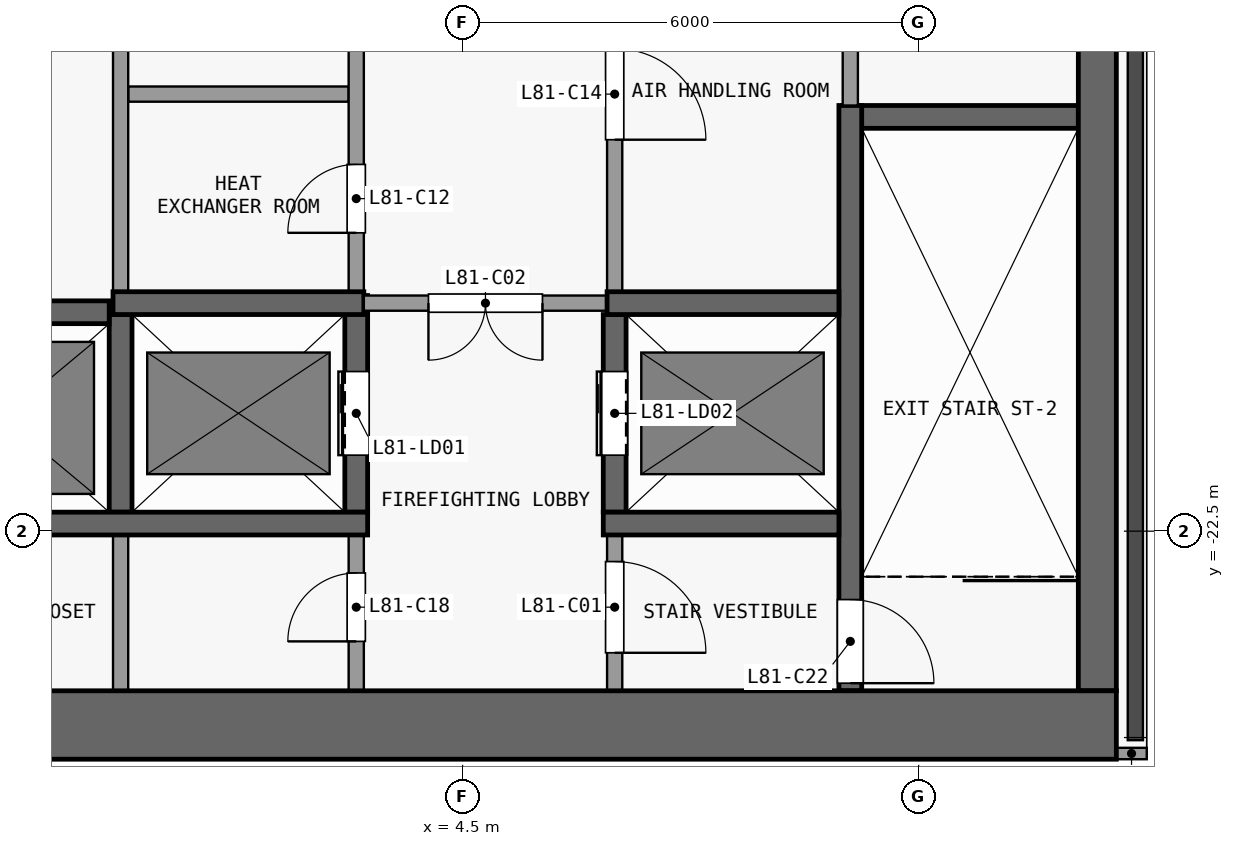
"""IFC4 building model, lengths in metres.
Left out: names, types, materials, properties, quantities, classifications, styles, units other than length and angle.
Written with IfcOpenShell. Run it as: python <this file> out.ifc"""

import sys

from ifc_helpers import new_model, si_unit, direction, frame, frame_2d, origin, place, context, subcontext, project, spatial, rectangle, extrude, element, fill, save


model = new_model("IFC4")
c1 = context("Model", 3, precision=1e-05, world=origin(), true_north=direction((0.0, 1.0)))
c2 = subcontext(c1, "Body", "Model", "MODEL_VIEW")
j1 = project(units=[si_unit("LENGTHUNIT", "METRE"), si_unit("PLANEANGLEUNIT", "RADIAN")], contexts=[c1])
p1 = place(None, origin())
s1 = spatial("IfcSite", under=j1, at=p1, CompositionType="ELEMENT")
p2 = place(p1, origin())
s2 = spatial("IfcBuilding", under=s1, at=p2, CompositionType="ELEMENT")
p3 = place(p2, frame((0.0, 0.0, 321.2)))
s3 = spatial("IfcBuildingStorey", under=s2, at=p3, CompositionType="ELEMENT", Elevation=321.2)
p4 = place(p3, frame((-13.1, -25.05, 0.0), z_axis=(0.0, 0.0, 1.0), x_axis=(1.0, 0.0, 0.0)))
e1 = element("IfcWall", 1, at=p4, inside=s3, PredefinedType="SHEAR", context=c2, shape_type="SweptSolid", body=[
    extrude(rectangle(XDim=26.2, YDim=0.9, at=frame_2d((13.1, 0.0))), origin(), (0.0, 0.0, 1.0), 4.05),
])
p5 = place(p3, frame((12.85, -24.6, 0.0), z_axis=(0.0, 0.0, 1.0), x_axis=(0.0, 1.0, 0.0)))
e2 = element("IfcWall", 2, at=p5, inside=s3, PredefinedType="SHEAR", context=c2, shape_type="SweptSolid", body=[
    extrude(rectangle(XDim=16.1, YDim=0.5, at=frame_2d((8.05, 0.0))), origin(), (0.0, 0.0, 1.0), 4.05),
])
p6 = place(p3, frame((-3.25, -22.4, 0.0), z_axis=(0.0, 0.0, 1.0), x_axis=(1.0, 0.0, 0.0)))
e3 = element("IfcWall", 3, at=p6, inside=s3, PredefinedType="SHEAR", context=c2, shape_type="SweptSolid", body=[
    extrude(rectangle(XDim=6.5, YDim=0.3, at=frame_2d((3.25, 0.0))), origin(), (0.0, 0.0, 1.0), 4.05),
])
p7 = place(p3, frame((6.35, -22.4, 0.0), z_axis=(0.0, 0.0, 1.0), x_axis=(1.0, 0.0, 0.0)))
e4 = element("IfcWall", 4, at=p7, inside=s3, PredefinedType="SHEAR", context=c2, shape_type="SweptSolid", body=[
    extrude(rectangle(XDim=3.1, YDim=0.3, at=frame_2d((1.55, 0.0))), origin(), (0.0, 0.0, 1.0), 4.05),
])
p8 = place(p3, frame((-3.2, -19.62, 0.0), z_axis=(0.0, 0.0, 1.0), x_axis=(1.0, 0.0, 0.0)))
e5 = element("IfcWall", 5, at=p8, inside=s3, PredefinedType="SHEAR", context=c2, shape_type="SweptSolid", body=[
    extrude(rectangle(XDim=3.05, YDim=0.3, at=frame_2d((1.525, 0.0))), origin(), (0.0, 0.0, 1.0), 4.05),
])
p9 = place(p3, frame((-0.1, -19.5, 0.0), z_axis=(0.0, 0.0, 1.0), x_axis=(1.0, 0.0, 0.0)))
e6 = element("IfcWall", 6, at=p9, inside=s3, PredefinedType="SHEAR", context=c2, shape_type="SweptSolid", body=[
    extrude(rectangle(XDim=3.3, YDim=0.3, at=frame_2d((1.65, 0.0))), origin(), (0.0, 0.0, 1.0), 4.05),
])
p10 = place(p3, frame((6.4, -19.5, 0.0), z_axis=(0.0, 0.0, 1.0), x_axis=(-1.0, 0.0, 0.0)))
e7 = element("IfcWall", 7, at=p10, inside=s3, PredefinedType="PARTITIONING", context=c2, shape_type="SweptSolid", body=[
    extrude(rectangle(XDim=3.2, YDim=0.2, at=frame_2d((1.6, 0.0))), origin(), (0.0, 0.0, 1.0), 4.05),
])
p11 = place(p10, frame((0.85, 0.0, 0.0)))
e8 = element("IfcOpeningElement", 8, at=p11, cuts=e7, PredefinedType="OPENING", context=c2, shape_type="SweptSolid", body=[
    extrude(rectangle(XDim=1.5, YDim=2.1, at=frame_2d((0.75, 1.05))), frame((0.0, 0.11, 0.0), z_axis=(0.0, -1.0, 0.0), x_axis=(1.0, 0.0, 0.0)), (0.0, 0.0, 1.0), 0.22),
])
p12 = place(p3, frame((6.4, -19.5, 0.0), z_axis=(0.0, 0.0, 1.0), x_axis=(1.0, 0.0, 0.0)))
e9 = element("IfcWall", 9, at=p12, inside=s3, PredefinedType="SHEAR", context=c2, shape_type="SweptSolid", body=[
    extrude(rectangle(XDim=3.05, YDim=0.3, at=frame_2d((1.525, 0.0))), origin(), (0.0, 0.0, 1.0), 4.05),
])
p13 = place(p3, frame((9.5, -17.05, 0.0), z_axis=(0.0, 0.0, 1.0), x_axis=(1.0, 0.0, 0.0)))
e10 = element("IfcWall", 10, at=p13, inside=s3, PredefinedType="SHEAR", context=c2, shape_type="SweptSolid", body=[
    extrude(rectangle(XDim=3.1, YDim=0.3, at=frame_2d((1.55, 0.0))), origin(), (0.0, 0.0, 1.0), 4.05),
])
p14 = place(p3, frame((0.1, -16.75, 0.0), z_axis=(0.0, 0.0, 1.0), x_axis=(1.0, 0.0, 0.0)))
e11 = element("IfcWall", 11, at=p14, inside=s3, PredefinedType="PARTITIONING", context=c2, shape_type="SweptSolid", body=[
    extrude(rectangle(XDim=2.9, YDim=0.2, at=frame_2d((1.45, 0.0))), origin(), (0.0, 0.0, 1.0), 4.05),
])
p15 = place(p3, frame((0.0, -24.6, 0.0), z_axis=(0.0, 0.0, 1.0), x_axis=(0.0, 1.0, 0.0)))
e12 = element("IfcWall", 12, at=p15, inside=s3, PredefinedType="PARTITIONING", context=c2, shape_type="SweptSolid", body=[
    extrude(rectangle(XDim=2.05, YDim=0.2, at=frame_2d((1.025, 0.0))), origin(), (0.0, 0.0, 1.0), 4.05),
])
p16 = place(p3, frame((0.0, -22.25, 0.0), z_axis=(0.0, 0.0, 1.0), x_axis=(0.0, 1.0, 0.0)))
e13 = element("IfcWall", 13, at=p16, inside=s3, PredefinedType="SHEAR", context=c2, shape_type="SweptSolid", body=[
    extrude(rectangle(XDim=2.6, YDim=0.3, at=frame_2d((1.3, 0.0))), origin(), (0.0, 0.0, 1.0), 4.05),
])
p17 = place(p3, frame((0.0, -19.35, 0.0), z_axis=(0.0, 0.0, 1.0), x_axis=(0.0, 1.0, 0.0)))
e14 = element("IfcWall", 14, at=p17, inside=s3, PredefinedType="PARTITIONING", context=c2, shape_type="SweptSolid", body=[
    extrude(rectangle(XDim=10.85, YDim=0.2, at=frame_2d((5.425, 0.0))), origin(), (0.0, 0.0, 1.0), 4.05),
])
p18 = place(p3, frame((3.1, -24.6, 0.0), z_axis=(0.0, 0.0, 1.0), x_axis=(0.0, 1.0, 0.0)))
e15 = element("IfcWall", 15, at=p18, inside=s3, PredefinedType="PARTITIONING", context=c2, shape_type="SweptSolid", body=[
    extrude(rectangle(XDim=2.05, YDim=0.2, at=frame_2d((1.025, 0.0))), origin(), (0.0, 0.0, 1.0), 4.05),
])
p19 = place(p18, frame((0.65, 0.0, 0.0)))
e16 = element("IfcOpeningElement", 16, at=p19, cuts=e15, PredefinedType="OPENING", context=c2, shape_type="SweptSolid", body=[
    extrude(rectangle(XDim=0.9, YDim=2.1, at=frame_2d((0.45, 1.05))), frame((0.0, 0.11, 0.0), z_axis=(0.0, -1.0, 0.0), x_axis=(1.0, 0.0, 0.0)), (0.0, 0.0, 1.0), 0.22),
])
p20 = place(p3, frame((3.1, -22.25, 0.0), z_axis=(0.0, 0.0, 1.0), x_axis=(0.0, 1.0, 0.0)))
e17 = element("IfcWall", 17, at=p20, inside=s3, PredefinedType="SHEAR", context=c2, shape_type="SweptSolid", body=[
    extrude(rectangle(XDim=2.85, YDim=0.3, at=frame_2d((1.425, 0.0))), origin(), (0.0, 0.0, 1.0), 4.05),
])
p21 = place(p20, frame((0.75, 0.0, 0.0)))
e18 = element("IfcOpeningElement", 18, at=p21, cuts=e17, PredefinedType="OPENING", context=c2, shape_type="SweptSolid", body=[
    extrude(rectangle(XDim=1.1, YDim=2.1, at=frame_2d((0.55, 1.05))), frame((0.0, 0.16, 0.0), z_axis=(0.0, -1.0, 0.0), x_axis=(1.0, 0.0, 0.0)), (0.0, 0.0, 1.0), 0.32),
])
p22 = place(p3, frame((3.1, -19.6, 0.0), z_axis=(0.0, 0.0, 1.0), x_axis=(0.0, 1.0, 0.0)))
e19 = element("IfcWall", 19, at=p22, inside=s3, PredefinedType="PARTITIONING", context=c2, shape_type="SweptSolid", body=[
    extrude(rectangle(XDim=11.1, YDim=0.2, at=frame_2d((5.55, 0.0))), origin(), (0.0, 0.0, 1.0), 4.05),
])
p23 = place(p22, frame((1.025, 0.0, 0.0)))
e20 = element("IfcOpeningElement", 20, at=p23, cuts=e19, PredefinedType="OPENING", context=c2, shape_type="SweptSolid", body=[
    extrude(rectangle(XDim=0.9, YDim=2.1, at=frame_2d((0.45, 1.05))), frame((0.0, 0.11, 0.0), z_axis=(0.0, -1.0, 0.0), x_axis=(1.0, 0.0, 0.0)), (0.0, 0.0, 1.0), 0.22),
])
p24 = place(p22, frame((6.375, 0.0, 0.0)))
e21 = element("IfcOpeningElement", 21, at=p24, cuts=e19, PredefinedType="OPENING", context=c2, shape_type="SweptSolid", body=[
    extrude(rectangle(XDim=1.2, YDim=2.1, at=frame_2d((0.6, 1.05))), frame((0.0, 0.11, 0.0), z_axis=(0.0, -1.0, 0.0), x_axis=(1.0, 0.0, 0.0)), (0.0, 0.0, 1.0), 0.22),
])
p25 = place(p3, frame((6.5, -22.55, 0.0), z_axis=(0.0, 0.0, 1.0), x_axis=(0.0, -1.0, 0.0)))
e22 = element("IfcWall", 22, at=p25, inside=s3, PredefinedType="PARTITIONING", context=c2, shape_type="SweptSolid", body=[
    extrude(rectangle(XDim=2.05, YDim=0.2, at=frame_2d((1.025, 0.0))), origin(), (0.0, 0.0, 1.0), 4.05),
])
p26 = place(p25, frame((0.35, 0.0, 0.0)))
e23 = element("IfcOpeningElement", 23, at=p26, cuts=e22, PredefinedType="OPENING", context=c2, shape_type="SweptSolid", body=[
    extrude(rectangle(XDim=1.2, YDim=2.1, at=frame_2d((0.6, 1.05))), frame((0.0, 0.11, 0.0), z_axis=(0.0, -1.0, 0.0), x_axis=(1.0, 0.0, 0.0)), (0.0, 0.0, 1.0), 0.22),
])
p27 = place(p3, frame((6.5, -22.25, 0.0), z_axis=(0.0, 0.0, 1.0), x_axis=(0.0, 1.0, 0.0)))
e24 = element("IfcWall", 24, at=p27, inside=s3, PredefinedType="SHEAR", context=c2, shape_type="SweptSolid", body=[
    extrude(rectangle(XDim=2.6, YDim=0.3, at=frame_2d((1.3, 0.0))), origin(), (0.0, 0.0, 1.0), 4.05),
])
p28 = place(p27, frame((0.75, 0.0, 0.0)))
e25 = element("IfcOpeningElement", 25, at=p28, cuts=e24, PredefinedType="OPENING", context=c2, shape_type="SweptSolid", body=[
    extrude(rectangle(XDim=1.1, YDim=2.1, at=frame_2d((0.55, 1.05))), frame((0.0, 0.16, 0.0), z_axis=(0.0, -1.0, 0.0), x_axis=(1.0, 0.0, 0.0)), (0.0, 0.0, 1.0), 0.32),
])
p29 = place(p3, frame((6.5, -8.5, 0.0), z_axis=(0.0, 0.0, 1.0), x_axis=(0.0, -1.0, 0.0)))
e26 = element("IfcWall", 26, at=p29, inside=s3, PredefinedType="PARTITIONING", context=c2, shape_type="SweptSolid", body=[
    extrude(rectangle(XDim=10.85, YDim=0.2, at=frame_2d((5.425, 0.0))), origin(), (0.0, 0.0, 1.0), 4.05),
])
p30 = place(p29, frame((7.65, 0.0, 0.0)))
e27 = element("IfcOpeningElement", 27, at=p30, cuts=e26, PredefinedType="OPENING", context=c2, shape_type="SweptSolid", body=[
    extrude(rectangle(XDim=1.2, YDim=2.1, at=frame_2d((0.6, 1.05))), frame((0.0, 0.11, 0.0), z_axis=(0.0, -1.0, 0.0), x_axis=(1.0, 0.0, 0.0)), (0.0, 0.0, 1.0), 0.22),
])
p31 = place(p29, frame((2.15, 0.0, 0.0)))
e28 = element("IfcOpeningElement", 28, at=p31, cuts=e26, PredefinedType="OPENING", context=c2, shape_type="SweptSolid", body=[
    extrude(rectangle(XDim=1.2, YDim=2.1, at=frame_2d((0.6, 1.05))), frame((0.0, 0.11, 0.0), z_axis=(0.0, -1.0, 0.0), x_axis=(1.0, 0.0, 0.0)), (0.0, 0.0, 1.0), 0.22),
])
p32 = place(p3, frame((9.6, -16.9, 0.0), z_axis=(0.0, 0.0, 1.0), x_axis=(0.0, -1.0, 0.0)))
e29 = element("IfcWall", 29, at=p32, inside=s3, PredefinedType="SHEAR", context=c2, shape_type="SweptSolid", body=[
    extrude(rectangle(XDim=7.7, YDim=0.3, at=frame_2d((3.85, 0.0))), origin(), (0.0, 0.0, 1.0), 4.05),
])
p33 = place(p32, frame((6.5, 0.0, 0.0)))
e30 = element("IfcOpeningElement", 30, at=p33, cuts=e29, PredefinedType="OPENING", context=c2, shape_type="SweptSolid", body=[
    extrude(rectangle(XDim=1.1, YDim=2.1, at=frame_2d((0.55, 1.05))), frame((0.0, 0.16, 0.0), z_axis=(0.0, -1.0, 0.0), x_axis=(1.0, 0.0, 0.0)), (0.0, 0.0, 1.0), 0.32),
])
p34 = place(p3, frame((9.6, -16.9, 0.0), z_axis=(0.0, 0.0, 1.0), x_axis=(0.0, 1.0, 0.0)))
e31 = element("IfcWall", 31, at=p34, inside=s3, PredefinedType="PARTITIONING", context=c2, shape_type="SweptSolid", body=[
    extrude(rectangle(XDim=8.4, YDim=0.2, at=frame_2d((4.2, 0.0))), origin(), (0.0, 0.0, 1.0), 4.05),
])
p35 = place(p3, frame((13.5, -25.425, 0.0), z_axis=(0.0, 0.0, 1.0), x_axis=(-1.0, 0.0, 0.0)))
e32 = element("IfcWall", 32, at=p35, inside=s3, PredefinedType="SOLIDWALL", context=c2, shape_type="SweptSolid", body=[
    extrude(rectangle(XDim=0.4, YDim=0.15, at=frame_2d((0.2, 0.0))), origin(), (0.0, 0.0, 1.0), 4.05),
])
p36 = place(p21, origin())
e33 = element("IfcDoor", 33, at=p36, inside=s3, OperationType="DOUBLE_DOOR_SLIDING", PredefinedType="DOOR", context=c2, shape_type="SweptSolid", body=[
    extrude(rectangle(XDim=1.1, YDim=2.1, at=frame_2d((0.55, 1.05))), frame((0.0, 0.025, 0.0), z_axis=(0.0, -1.0, 0.0), x_axis=(1.0, 0.0, 0.0)), (0.0, 0.0, 1.0), 0.05),
])
fill(e18, e33)
p37 = place(p28, origin())
e34 = element("IfcDoor", 34, at=p37, inside=s3, OperationType="DOUBLE_DOOR_SLIDING", PredefinedType="DOOR", context=c2, shape_type="SweptSolid", body=[
    extrude(rectangle(XDim=1.1, YDim=2.1, at=frame_2d((0.55, 1.05))), frame((0.0, 0.025, 0.0), z_axis=(0.0, -1.0, 0.0), x_axis=(1.0, 0.0, 0.0)), (0.0, 0.0, 1.0), 0.05),
])
fill(e25, e34)
p38 = place(p26, origin())
e35 = element("IfcDoor", 35, at=p38, inside=s3, OperationType="SINGLE_SWING_RIGHT", PredefinedType="DOOR", context=c2, shape_type="SweptSolid", body=[
    extrude(rectangle(XDim=1.2, YDim=2.1, at=frame_2d((0.6, 1.05))), frame((0.0, 0.025, 0.0), z_axis=(0.0, -1.0, 0.0), x_axis=(1.0, 0.0, 0.0)), (0.0, 0.0, 1.0), 0.05),
])
fill(e23, e35)
p39 = place(p11, origin())
e36 = element("IfcDoor", 36, at=p39, inside=s3, OperationType="DOUBLE_DOOR_SINGLE_SWING", PredefinedType="DOOR", context=c2, shape_type="SweptSolid", body=[
    extrude(rectangle(XDim=1.5, YDim=2.1, at=frame_2d((0.75, 1.05))), frame((0.0, 0.025, 0.0), z_axis=(0.0, -1.0, 0.0), x_axis=(1.0, 0.0, 0.0)), (0.0, 0.0, 1.0), 0.05),
])
fill(e8, e36)
p40 = place(p23, origin())
e37 = element("IfcDoor", 37, at=p40, inside=s3, OperationType="SINGLE_SWING_LEFT", PredefinedType="DOOR", context=c2, shape_type="SweptSolid", body=[
    extrude(rectangle(XDim=0.9, YDim=2.1, at=frame_2d((0.45, 1.05))), frame((0.0, 0.025, 0.0), z_axis=(0.0, -1.0, 0.0), x_axis=(1.0, 0.0, 0.0)), (0.0, 0.0, 1.0), 0.05),
])
fill(e20, e37)
p41 = place(p30, origin())
e38 = element("IfcDoor", 38, at=p41, inside=s3, OperationType="SINGLE_SWING_RIGHT", PredefinedType="DOOR", context=c2, shape_type="SweptSolid", body=[
    extrude(rectangle(XDim=1.2, YDim=2.1, at=frame_2d((0.6, 1.05))), frame((0.0, 0.025, 0.0), z_axis=(0.0, -1.0, 0.0), x_axis=(1.0, 0.0, 0.0)), (0.0, 0.0, 1.0), 0.05),
])
fill(e27, e38)
p42 = place(p19, origin())
e39 = element("IfcDoor", 39, at=p42, inside=s3, OperationType="SINGLE_SWING_LEFT", PredefinedType="DOOR", context=c2, shape_type="SweptSolid", body=[
    extrude(rectangle(XDim=0.9, YDim=2.1, at=frame_2d((0.45, 1.05))), frame((0.0, 0.025, 0.0), z_axis=(0.0, -1.0, 0.0), x_axis=(1.0, 0.0, 0.0)), (0.0, 0.0, 1.0), 0.05),
])
fill(e16, e39)
p43 = place(p33, origin())
e40 = element("IfcDoor", 40, at=p43, inside=s3, OperationType="SINGLE_SWING_RIGHT", PredefinedType="DOOR", context=c2, shape_type="SweptSolid", body=[
    extrude(rectangle(XDim=1.1, YDim=2.1, at=frame_2d((0.55, 1.05))), frame((0.0, 0.025, 0.0), z_axis=(0.0, -1.0, 0.0), x_axis=(1.0, 0.0, 0.0)), (0.0, 0.0, 1.0), 0.05),
])
fill(e30, e40)
save(model, sys.argv[1])
